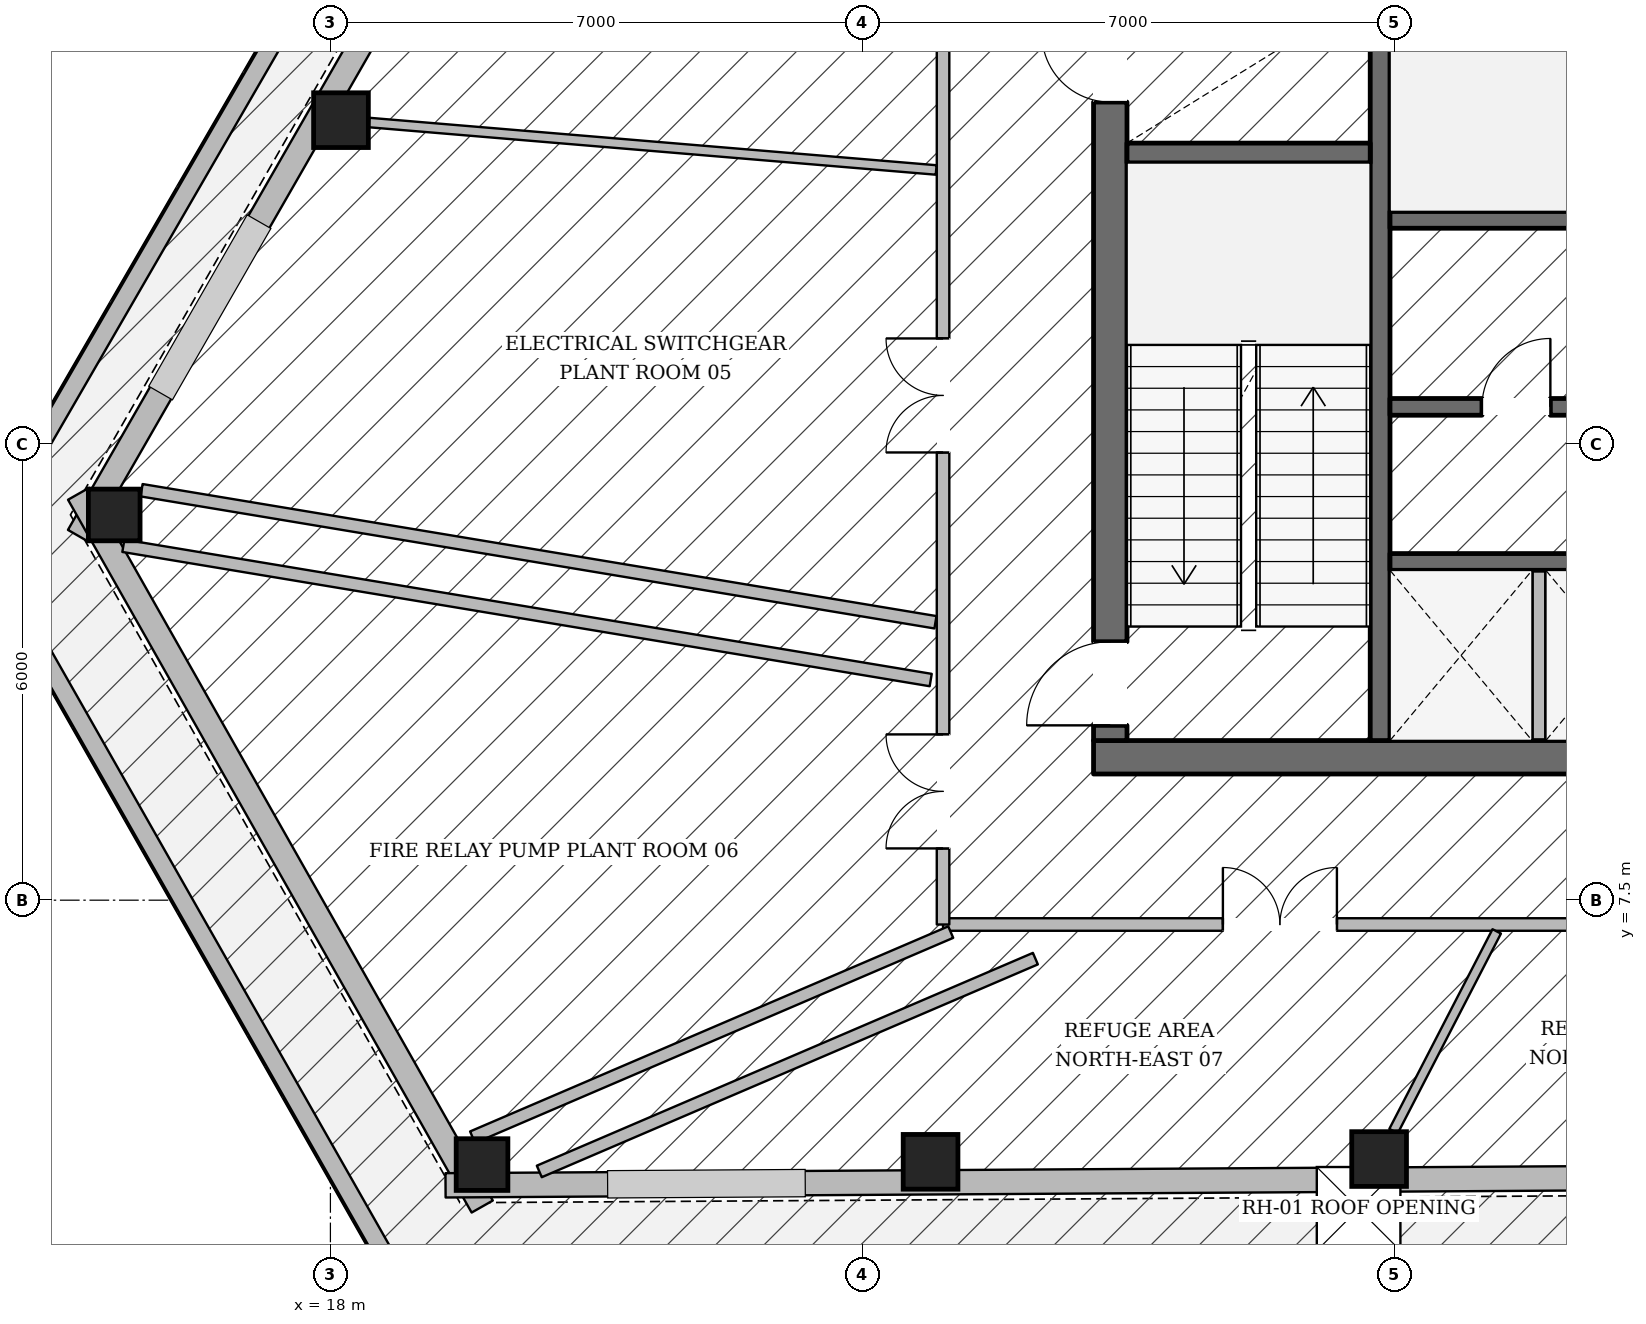
"""IFC4 building model, lengths in metres.
Left out: names, types, materials, properties, quantities, classifications, styles, units other than length and angle.
Written with IfcOpenShell. Run it as: python <this file> out.ifc"""

import sys

from ifc_helpers import new_model, si_unit, direction, frame, frame_2d, origin, origin_2d, place, context, subcontext, project, spatial, rectangle, hollow_rectangle, extrude, element, fill, save


model = new_model("IFC4")
c1 = context("Model", 3, precision=1e-05, world=origin(), true_north=direction((0.0, 1.0)))
c2 = subcontext(c1, "Body", "Model", "MODEL_VIEW")
j1 = project(units=[si_unit("LENGTHUNIT", "METRE"), si_unit("PLANEANGLEUNIT", "RADIAN")], contexts=[c1])
p1 = place(None, origin())
s1 = spatial("IfcSite", under=j1, at=p1, CompositionType="ELEMENT")
p2 = place(p1, origin())
s2 = spatial("IfcBuilding", under=s1, at=p2, CompositionType="ELEMENT")
p3 = place(p2, frame((0.0, 0.0, 154.8)))
s3 = spatial("IfcBuildingStorey", under=s2, at=p3, CompositionType="ELEMENT", Elevation=154.8)
p4 = place(p3, frame((28.04, 9.38, 0.0), z_axis=(0.0, 0.0, 1.0), x_axis=(1.0, 0.0, 0.0)))
e1 = element("IfcWall", 1, at=p4, inside=s3, PredefinedType="SOLIDWALL", context=c2, shape_type="SweptSolid", body=[
    extrude(rectangle(XDim=19.92, YDim=0.44, at=frame_2d((9.96, 0.0))), origin(), (0.0, 0.0, 1.0), 4.985),
])
p5 = place(p4, frame((10.46, 0.0, 0.0)))
e2 = element("IfcOpeningElement", 2, at=p5, cuts=e1, PredefinedType="OPENING", context=c2, shape_type="SweptSolid", body=[
    extrude(rectangle(XDim=1.4, YDim=2.2, at=frame_2d((0.7, 1.1))), frame((0.0, 0.23, 0.0), z_axis=(0.0, -1.0, 0.0), x_axis=(1.0, 0.0, 0.0)), (0.0, 0.0, 1.0), 0.46),
])
p6 = place(p3, frame((28.26, 9.6, 0.0), z_axis=(0.0, 0.0, 1.0), x_axis=(0.0, 1.0, 0.0)))
e3 = element("IfcWall", 3, at=p6, inside=s3, PredefinedType="SOLIDWALL", context=c2, shape_type="SweptSolid", body=[
    extrude(rectangle(XDim=13.0, YDim=0.44, at=frame_2d((6.5, 0.0))), origin(), (0.0, 0.0, 1.0), 4.985),
])
p7 = place(p6, frame((0.2, 0.0, 0.0)))
e4 = element("IfcOpeningElement", 4, at=p7, cuts=e3, PredefinedType="OPENING", context=c2, shape_type="SweptSolid", body=[
    extrude(rectangle(XDim=1.1, YDim=2.15, at=frame_2d((0.55, 1.075))), frame((0.0, 0.23, 0.0), z_axis=(0.0, -1.0, 0.0), x_axis=(1.0, 0.0, 0.0)), (0.0, 0.0, 1.0), 0.46),
])
p8 = place(p6, frame((8.4, 0.0, 0.0)))
e5 = element("IfcOpeningElement", 5, at=p8, cuts=e3, PredefinedType="OPENING", context=c2, shape_type="SweptSolid", body=[
    extrude(rectangle(XDim=0.9, YDim=2.1, at=frame_2d((0.45, 1.05))), frame((0.0, 0.23, 0.0), z_axis=(0.0, -1.0, 0.0), x_axis=(1.0, 0.0, 0.0)), (0.0, 0.0, 1.0), 0.46),
])
p9 = place(p3, frame((31.81, 9.6, 0.0), z_axis=(0.0, 0.0, 1.0), x_axis=(0.0, 1.0, 0.0)))
e6 = element("IfcWall", 6, at=p9, inside=s3, PredefinedType="SHEAR", context=c2, shape_type="SweptSolid", body=[
    extrude(rectangle(XDim=13.0, YDim=0.26, at=frame_2d((6.5, 0.0))), origin(), (0.0, 0.0, 1.0), 4.985),
])
p10 = place(p9, frame((10.925, 0.0, 0.0)))
e7 = element("IfcOpeningElement", 7, at=p10, cuts=e6, PredefinedType="OPENING", context=c2, shape_type="SweptSolid", body=[
    extrude(rectangle(XDim=1.25, YDim=2.25, at=frame_2d((0.625, 1.125))), frame((0.0, 0.14, 0.0), z_axis=(0.0, -1.0, 0.0), x_axis=(1.0, 0.0, 0.0)), (0.0, 0.0, 1.0), 0.28),
])
p11 = place(p3, frame((28.48, 17.33, 0.0), z_axis=(0.0, 0.0, 1.0), x_axis=(1.0, 0.0, 0.0)))
e8 = element("IfcWall", 8, at=p11, inside=s3, PredefinedType="SHEAR", context=c2, shape_type="SweptSolid", body=[
    extrude(rectangle(XDim=3.2, YDim=0.26, at=frame_2d((1.6, 0.0))), origin(), (0.0, 0.0, 1.0), 4.985),
])
p12 = place(p3, frame((31.94, 16.45, 0.0), z_axis=(0.0, 0.0, 1.0), x_axis=(1.0, 0.0, 0.0)))
e9 = element("IfcWall", 9, at=p12, inside=s3, PredefinedType="SOLIDWALL", context=c2, shape_type="SweptSolid", body=[
    extrude(rectangle(XDim=12.12, YDim=0.22, at=frame_2d((6.06, 0.0))), origin(), (0.0, 0.0, 1.0), 4.985),
])
p13 = place(p3, frame((31.94, 13.99, 0.0), z_axis=(0.0, 0.0, 1.0), x_axis=(1.0, 0.0, 0.0)))
e10 = element("IfcWall", 10, at=p13, inside=s3, PredefinedType="SOLIDWALL", context=c2, shape_type="SweptSolid", body=[
    extrude(rectangle(XDim=12.12, YDim=0.22, at=frame_2d((6.06, 0.0))), origin(), (0.0, 0.0, 1.0), 4.985),
])
p14 = place(p13, frame((1.21, 0.0, 0.0)))
e11 = element("IfcOpeningElement", 11, at=p14, cuts=e10, PredefinedType="OPENING", context=c2, shape_type="SweptSolid", body=[
    extrude(rectangle(XDim=0.9, YDim=2.1, at=frame_2d((0.45, 1.05))), frame((0.0, 0.12, 0.0), z_axis=(0.0, -1.0, 0.0), x_axis=(1.0, 0.0, 0.0)), (0.0, 0.0, 1.0), 0.24),
])
p15 = place(p13, frame((4.31, 0.0, 0.0)))
e12 = element("IfcOpeningElement", 12, at=p15, cuts=e10, PredefinedType="OPENING", context=c2, shape_type="SweptSolid", body=[
    extrude(rectangle(XDim=0.9, YDim=2.1, at=frame_2d((0.45, 1.05))), frame((0.0, 0.12, 0.0), z_axis=(0.0, -1.0, 0.0), x_axis=(1.0, 0.0, 0.0)), (0.0, 0.0, 1.0), 0.24),
])
p16 = place(p13, frame((6.535, 0.0, 0.0)))
e13 = element("IfcOpeningElement", 13, at=p16, cuts=e10, PredefinedType="OPENING", context=c2, shape_type="SweptSolid", body=[
    extrude(rectangle(XDim=1.1, YDim=2.2, at=frame_2d((0.55, 1.1))), frame((0.0, 0.12, 0.0), z_axis=(0.0, -1.0, 0.0), x_axis=(1.0, 0.0, 0.0)), (0.0, 0.0, 1.0), 0.24),
])
p17 = place(p13, frame((8.585, 0.0, 0.0)))
e14 = element("IfcOpeningElement", 14, at=p17, cuts=e10, PredefinedType="OPENING", context=c2, shape_type="SweptSolid", body=[
    extrude(rectangle(XDim=1.1, YDim=2.2, at=frame_2d((0.55, 1.1))), frame((0.0, 0.12, 0.0), z_axis=(0.0, -1.0, 0.0), x_axis=(1.0, 0.0, 0.0)), (0.0, 0.0, 1.0), 0.24),
])
p18 = place(p13, frame((10.635, 0.0, 0.0)))
e15 = element("IfcOpeningElement", 15, at=p18, cuts=e10, PredefinedType="OPENING", context=c2, shape_type="SweptSolid", body=[
    extrude(rectangle(XDim=1.1, YDim=2.2, at=frame_2d((0.55, 1.1))), frame((0.0, 0.12, 0.0), z_axis=(0.0, -1.0, 0.0), x_axis=(1.0, 0.0, 0.0)), (0.0, 0.0, 1.0), 0.24),
])
p19 = place(p3, frame((31.94, 11.95, 0.0), z_axis=(0.0, 0.0, 1.0), x_axis=(1.0, 0.0, 0.0)))
e16 = element("IfcWall", 16, at=p19, inside=s3, PredefinedType="SOLIDWALL", context=c2, shape_type="SweptSolid", body=[
    extrude(rectangle(XDim=6.19, YDim=0.22, at=frame_2d((3.095, 0.0))), origin(), (0.0, 0.0, 1.0), 4.985),
])
p20 = place(p3, frame((18.139, 17.762, 0.0), z_axis=(0.0, 0.0, 1.0), x_axis=(1.0, 0.0, 0.0)))
e17 = element("IfcColumn", 17, at=p20, inside=s3, PredefinedType="COLUMN", context=c2, shape_type="SweptSolid", body=[
    extrude(hollow_rectangle(XDim=0.72, YDim=0.72, WallThickness=0.032, at=origin_2d()), origin(), (0.0, 0.0, 1.0), 4.985),
])
for number, where, z_axis, x_axis in (
    (18, (15.156, 12.568, 0.0), (0.0, 0.0, 1.0), (1.0, 0.0, 0.0)),
    (19, (19.995, 4.021, 0.0), (0.0, 0.0, 1.0), (1.0, 0.0, 0.0)),
):
    element("IfcColumn", number, at=place(p3, frame(where, z_axis=z_axis, x_axis=x_axis)), inside=s3, PredefinedType="COLUMN", context=c2, shape_type="SweptSolid", body=[
        extrude(hollow_rectangle(XDim=0.68, YDim=0.68, WallThickness=0.03, at=origin_2d()), origin(), (0.0, 0.0, 1.0), 4.985),
    ])
for number, where, z_axis, x_axis in (
    (20, (25.896, 4.058, 0.0), (0.0, 0.0, 1.0), (1.0, 0.0, 0.0)),
    (21, (31.797, 4.094, 0.0), (0.0, 0.0, 1.0), (1.0, 0.0, 0.0)),
):
    element("IfcColumn", number, at=place(p3, frame(where, z_axis=z_axis, x_axis=x_axis)), inside=s3, PredefinedType="COLUMN", context=c2, shape_type="SweptSolid", body=[
        extrude(hollow_rectangle(XDim=0.72, YDim=0.72, WallThickness=0.032, at=origin_2d()), origin(), (0.0, 0.0, 1.0), 4.985),
    ])
p21 = place(p3, frame((14.686, 12.292, 0.0), z_axis=(0.0, 0.0, 1.0), x_axis=(0.498068556708, 0.867137655057, 0.0)))
e22 = element("IfcWall", 22, at=p21, inside=s3, PredefinedType="STANDARD", context=c2, shape_type="SweptSolid", body=[
    extrude(rectangle(XDim=36.888, YDim=0.32, at=frame_2d((18.444, 0.0))), origin(), (0.0, 0.0, 1.0), 3.677),
])
p22 = place(p3, frame((19.997, 3.469, 0.0), z_axis=(0.0, 0.0, 1.0), x_axis=(-0.492707309424, 0.870195097228, 0.0)))
e23 = element("IfcWall", 23, at=p22, inside=s3, PredefinedType="STANDARD", context=c2, shape_type="SweptSolid", body=[
    extrude(rectangle(XDim=10.777, YDim=0.32, at=frame_2d((5.388, 0.0))), origin(), (0.0, 0.0, 1.0), 3.677),
])
p23 = place(p3, frame((55.878, 3.973, 0.0), z_axis=(0.0, 0.0, 1.0), x_axis=(-0.999981007106, -0.006163231827, 0.0)))
e24 = element("IfcWall", 24, at=p23, inside=s3, PredefinedType="STANDARD", context=c2, shape_type="SweptSolid", body=[
    extrude(rectangle(XDim=36.364, YDim=0.32, at=frame_2d((18.182, 0.0))), origin(), (0.0, 0.0, 1.0), 3.677),
])
p24 = place(p3, frame((32.566, 45.26, 0.0), z_axis=(0.0, 0.0, 1.0), x_axis=(-0.50091530354, -0.865496307721, 0.0)))
e25 = element("IfcWall", 25, at=p24, inside=s3, PredefinedType="PARAPET", context=c2, shape_type="SweptSolid", body=[
    extrude(rectangle(XDim=38.428, YDim=0.24, at=frame_2d((19.214, 0.0))), origin(), (0.0, 0.0, 1.0), 1.25),
])
p25 = place(p3, frame((13.318, 12.313, 0.0), z_axis=(0.0, 0.0, 1.0), x_axis=(0.494370417015, -0.869251339245, 0.0)))
e26 = element("IfcWall", 26, at=p25, inside=s3, PredefinedType="PARAPET", context=c2, shape_type="SweptSolid", body=[
    extrude(rectangle(XDim=11.246, YDim=0.24, at=frame_2d((5.623, 0.0))), origin(), (0.0, 0.0, 1.0), 1.25),
])
p26 = place(p3, frame((18.605, 2.695, 0.0), z_axis=(0.0, 0.0, 1.0), x_axis=(0.999971463124, 0.007554663279, 0.0)))
e27 = element("IfcWall", 27, at=p26, inside=s3, PredefinedType="PARAPET", context=c2, shape_type="SweptSolid", body=[
    extrude(rectangle(XDim=38.004, YDim=0.24, at=frame_2d((19.002, 0.0))), origin(), (0.0, 0.0, 1.0), 1.25),
])
p27 = place(p3, frame((33.9, 9.52, 0.0), z_axis=(0.0, 0.0, 1.0), x_axis=(0.0, 1.0, 0.0)))
e28 = element("IfcWall", 28, at=p27, inside=s3, PredefinedType="PARTITIONING", context=c2, shape_type="SweptSolid", body=[
    extrude(rectangle(XDim=2.32, YDim=0.165, at=frame_2d((1.16, 0.0))), origin(), (0.0, 0.0, 1.0), 4.985),
])
p28 = place(p3, frame((26.06, 7.18, 0.0), z_axis=(0.0, 0.0, 1.0), x_axis=(1.0, 0.0, 0.0)))
e29 = element("IfcWall", 29, at=p28, inside=s3, PredefinedType="PARTITIONING", context=c2, shape_type="SweptSolid", body=[
    extrude(rectangle(XDim=23.88, YDim=0.165, at=frame_2d((11.94, 0.0))), origin(), (0.0, 0.0, 1.0), 2.825),
])
p29 = place(p28, frame((3.682, 0.0, 0.0)))
e30 = element("IfcOpeningElement", 30, at=p29, cuts=e29, PredefinedType="OPENING", context=c2, shape_type="SweptSolid", body=[
    extrude(rectangle(XDim=1.5, YDim=2.25, at=frame_2d((0.75, 1.125))), frame((0.0, 0.093, 0.0), z_axis=(0.0, -1.0, 0.0), x_axis=(1.0, 0.0, 0.0)), (0.0, 0.0, 1.0), 0.185),
])
p30 = place(p28, frame((13.829, 0.0, 0.0)))
e31 = element("IfcOpeningElement", 31, at=p30, cuts=e29, PredefinedType="OPENING", context=c2, shape_type="SweptSolid", body=[
    extrude(rectangle(XDim=1.5, YDim=2.25, at=frame_2d((0.75, 1.125))), frame((0.0, 0.093, 0.0), z_axis=(0.0, -1.0, 0.0), x_axis=(1.0, 0.0, 0.0)), (0.0, 0.0, 1.0), 0.185),
])
p31 = place(p3, frame((26.06, 7.18, 0.0), z_axis=(0.0, 0.0, 1.0), x_axis=(0.0, 1.0, 0.0)))
e32 = element("IfcWall", 32, at=p31, inside=s3, PredefinedType="PARTITIONING", context=c2, shape_type="SweptSolid", body=[
    extrude(rectangle(XDim=17.84, YDim=0.165, at=frame_2d((8.92, 0.0))), origin(), (0.0, 0.0, 1.0), 4.673),
])
p32 = place(p31, frame((13.05, 0.0, 0.0)))
e33 = element("IfcOpeningElement", 33, at=p32, cuts=e32, PredefinedType="OPENING", context=c2, shape_type="SweptSolid", body=[
    extrude(rectangle(XDim=1.5, YDim=2.25, at=frame_2d((0.75, 1.125))), frame((0.0, 0.093, 0.0), z_axis=(0.0, -1.0, 0.0), x_axis=(1.0, 0.0, 0.0)), (0.0, 0.0, 1.0), 0.185),
])
p33 = place(p31, frame((6.21, 0.0, 0.0)))
e34 = element("IfcOpeningElement", 34, at=p33, cuts=e32, PredefinedType="OPENING", context=c2, shape_type="SweptSolid", body=[
    extrude(rectangle(XDim=1.5, YDim=2.25, at=frame_2d((0.75, 1.125))), frame((0.0, 0.093, 0.0), z_axis=(0.0, -1.0, 0.0), x_axis=(1.0, 0.0, 0.0)), (0.0, 0.0, 1.0), 0.185),
])
p34 = place(p31, frame((1.001, 0.0, 0.0)))
e35 = element("IfcOpeningElement", 35, at=p34, cuts=e32, PredefinedType="OPENING", context=c2, shape_type="SweptSolid", body=[
    extrude(rectangle(XDim=1.5, YDim=2.25, at=frame_2d((0.75, 1.125))), frame((0.0, 0.093, 0.0), z_axis=(0.0, -1.0, 0.0), x_axis=(1.0, 0.0, 0.0)), (0.0, 0.0, 1.0), 0.185),
])
p35 = place(p3, frame((25.898, 10.396, 0.0), z_axis=(0.0, 0.0, 1.0), x_axis=(-0.98644902096, 0.164068062237, 0.0)))
e36 = element("IfcWall", 36, at=p35, inside=s3, PredefinedType="PARTITIONING", context=c2, shape_type="SweptSolid", body=[
    extrude(rectangle(XDim=10.768, YDim=0.165, at=frame_2d((5.384, 0.0))), origin(), (0.0, 0.0, 1.0), 4.673),
])
p36 = place(p3, frame((25.96, 11.156, 0.0), z_axis=(0.0, 0.0, 1.0), x_axis=(-0.986449334404, 0.164066177664, 0.0)))
e37 = element("IfcWall", 37, at=p36, inside=s3, PredefinedType="PARTITIONING", context=c2, shape_type="SweptSolid", body=[
    extrude(rectangle(XDim=10.588, YDim=0.165, at=frame_2d((5.294, 0.0))), origin(), (0.0, 0.0, 1.0), 4.985),
])
p37 = place(p3, frame((27.275, 6.731, 0.0), z_axis=(0.0, 0.0, 1.0), x_axis=(-0.919038308649, -0.394168222001, 0.0)))
e38 = element("IfcWall", 38, at=p37, inside=s3, PredefinedType="PARTITIONING", context=c2, shape_type="SweptSolid", body=[
    extrude(rectangle(XDim=7.102, YDim=0.165, at=frame_2d((3.551, 0.0))), origin(), (0.0, 0.0, 1.0), 3.68),
])
p38 = place(p3, frame((26.161, 7.08, 0.0), z_axis=(0.0, 0.0, 1.0), x_axis=(-0.919021386339, -0.394207675536, 0.0)))
e39 = element("IfcWall", 39, at=p38, inside=s3, PredefinedType="PARTITIONING", context=c2, shape_type="SweptSolid", body=[
    extrude(rectangle(XDim=6.845, YDim=0.165, at=frame_2d((3.423, 0.0))), origin(), (0.0, 0.0, 1.0), 4.985),
])
p39 = place(p3, frame((25.969, 17.107, 0.0), z_axis=(0.0, 0.0, 1.0), x_axis=(-0.996519175933, 0.083363853067, 0.0)))
e40 = element("IfcWall", 40, at=p39, inside=s3, PredefinedType="PARTITIONING", context=c2, shape_type="SweptSolid", body=[
    extrude(rectangle(XDim=7.489, YDim=0.125, at=frame_2d((3.744, 0.0))), origin(), (0.0, 0.0, 1.0), 3.68),
])
p40 = place(p3, frame((33.344, 7.09, 0.0), z_axis=(0.0, 0.0, 1.0), x_axis=(-0.459029826467, -0.888420856584, 0.0)))
e41 = element("IfcWall", 41, at=p40, inside=s3, PredefinedType="PARTITIONING", context=c2, shape_type="SweptSolid", body=[
    extrude(rectangle(XDim=2.957, YDim=0.125, at=frame_2d((1.479, 0.0))), origin(), (0.0, 0.0, 1.0), 3.68),
])
p41 = place(p3, frame((0.0, 0.0, -0.22)))
p42 = place(p41, frame((31.527, 3.439, 0.0)))
p43 = place(p42, frame((0.0, 0.0, 0.17)))
e42 = element("IfcWindow", 42, at=p43, inside=s3, PartitioningType="SINGLE_PANEL", PredefinedType="SKYLIGHT", context=c2, shape_type="SweptSolid", body=[
    extrude(rectangle(XDim=1.1, YDim=1.1, at=origin_2d()), origin(), (0.0, 0.0, 1.0), 0.05),
])
p44 = place(p7, origin())
e43 = element("IfcDoor", 43, at=p44, inside=s3, OperationType="SINGLE_SWING_LEFT", PredefinedType="DOOR", context=c2, shape_type="SweptSolid", body=[
    extrude(rectangle(XDim=1.1, YDim=2.15, at=frame_2d((0.55, 1.075))), frame((0.0, 0.025, 0.0), z_axis=(0.0, -1.0, 0.0), x_axis=(1.0, 0.0, 0.0)), (0.0, 0.0, 1.0), 0.05),
])
fill(e4, e43)
p45 = place(p8, origin())
e44 = element("IfcDoor", 44, at=p45, inside=s3, OperationType="SINGLE_SWING_RIGHT", PredefinedType="DOOR", context=c2, shape_type="SweptSolid", body=[
    extrude(rectangle(XDim=0.9, YDim=2.1, at=frame_2d((0.45, 1.05))), frame((0.0, 0.025, 0.0), z_axis=(0.0, -1.0, 0.0), x_axis=(1.0, 0.0, 0.0)), (0.0, 0.0, 1.0), 0.05),
])
fill(e5, e44)
p46 = place(p14, origin())
e45 = element("IfcDoor", 45, at=p46, inside=s3, OperationType="SINGLE_SWING_RIGHT", PredefinedType="DOOR", context=c2, shape_type="SweptSolid", body=[
    extrude(rectangle(XDim=0.9, YDim=2.1, at=frame_2d((0.45, 1.05))), frame((0.0, 0.025, 0.0), z_axis=(0.0, -1.0, 0.0), x_axis=(1.0, 0.0, 0.0)), (0.0, 0.0, 1.0), 0.05),
])
fill(e11, e45)
p47 = place(p33, origin())
e46 = element("IfcDoor", 46, at=p47, inside=s3, OperationType="DOUBLE_DOOR_SINGLE_SWING", PredefinedType="DOOR", context=c2, shape_type="SweptSolid", body=[
    extrude(rectangle(XDim=1.5, YDim=2.25, at=frame_2d((0.75, 1.125))), frame((0.0, 0.025, 0.0), z_axis=(0.0, -1.0, 0.0), x_axis=(1.0, 0.0, 0.0)), (0.0, 0.0, 1.0), 0.05),
])
fill(e34, e46)
p48 = place(p34, origin())
e47 = element("IfcDoor", 47, at=p48, inside=s3, OperationType="DOUBLE_DOOR_SINGLE_SWING", PredefinedType="DOOR", context=c2, shape_type="SweptSolid", body=[
    extrude(rectangle(XDim=1.5, YDim=2.25, at=frame_2d((0.75, 1.125))), frame((0.0, 0.025, 0.0), z_axis=(0.0, -1.0, 0.0), x_axis=(1.0, 0.0, 0.0)), (0.0, 0.0, 1.0), 0.05),
])
fill(e35, e47)
p49 = place(p29, origin())
e48 = element("IfcDoor", 48, at=p49, inside=s3, OperationType="DOUBLE_DOOR_SINGLE_SWING", PredefinedType="DOOR", context=c2, shape_type="SweptSolid", body=[
    extrude(rectangle(XDim=1.5, YDim=2.25, at=frame_2d((0.75, 1.125))), frame((0.0, 0.025, 0.0), z_axis=(0.0, -1.0, 0.0), x_axis=(1.0, 0.0, 0.0)), (0.0, 0.0, 1.0), 0.05),
])
fill(e30, e48)
save(model, sys.argv[1])
